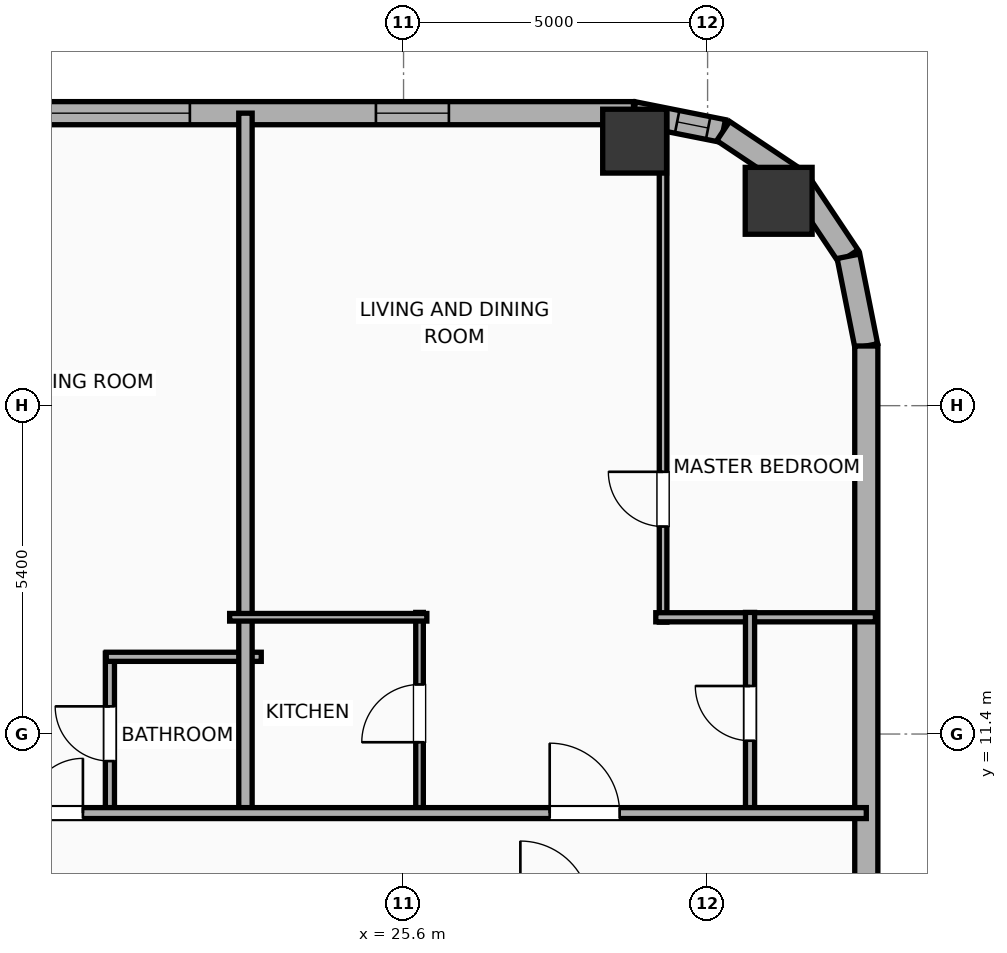
"""IFC4 building model, lengths in metres.
Left out: names, types, materials, properties, quantities, classifications, styles, units other than length and angle.
Written with IfcOpenShell. Run it as: python <this file> out.ifc"""

import sys

from ifc_helpers import new_model, si_unit, direction, frame, frame_2d, origin, origin_2d, place, context, subcontext, project, spatial, rectangle, hollow_rectangle, hollow_circle, extrude, element, fill, save


model = new_model("IFC4")
c1 = context("Model", 3, precision=1e-05, world=origin(), true_north=direction((0.0, 1.0)))
c2 = subcontext(c1, "Body", "Model", "MODEL_VIEW")
j1 = project(units=[si_unit("LENGTHUNIT", "METRE"), si_unit("PLANEANGLEUNIT", "RADIAN")], contexts=[c1])
p1 = place(None, origin())
s1 = spatial("IfcSite", under=j1, at=p1, CompositionType="ELEMENT")
p2 = place(p1, origin())
s2 = spatial("IfcBuilding", under=s1, at=p2, CompositionType="ELEMENT")
p3 = place(p2, frame((0.0, 0.0, 128.7)))
s3 = spatial("IfcBuildingStorey", under=s2, at=p3, CompositionType="ELEMENT", Elevation=128.7)
p4 = place(p3, frame((31.769, 20.169, 0.0), z_axis=(0.0, 0.0, 1.0), x_axis=(1.0, 0.0, 0.0)))
e1 = element("IfcColumn", 1, at=p4, inside=s3, PredefinedType="COLUMN", context=c2, shape_type="SweptSolid", body=[
    extrude(hollow_circle(Radius=0.55, WallThickness=0.036, at=origin_2d()), origin(), (0.0, 0.0, 1.0), 3.9),
])
p5 = place(p3, frame((29.4, 21.15, 0.0), z_axis=(0.0, 0.0, 1.0), x_axis=(1.0, 0.0, 0.0)))
e2 = element("IfcColumn", 2, at=p5, inside=s3, PredefinedType="COLUMN", context=c2, shape_type="SweptSolid", body=[
    extrude(hollow_rectangle(XDim=1.05, YDim=1.05, WallThickness=0.036, at=origin_2d()), origin(), (0.0, 0.0, 1.0), 3.9),
])
p6 = place(p3, frame((-25.381, 21.61, 0.0), z_axis=(0.0, 0.0, 1.0), x_axis=(1.0, 0.0, 0.0)))
e3 = element("IfcWall", 3, at=p6, inside=s3, PredefinedType="ELEMENTEDWALL", context=c2, shape_type="SweptSolid", body=[
    extrude(rectangle(XDim=54.763, YDim=0.38, at=frame_2d((27.381, 0.0))), origin(), (0.0, 0.0, 1.0), 3.65),
])
p7 = place(p6, frame((5.645, 0.0, 0.75)))
e4 = element("IfcOpeningElement", 4, at=p7, cuts=e3, PredefinedType="OPENING", context=c2, shape_type="SweptSolid", body=[
    extrude(rectangle(XDim=2.4, YDim=2.1, at=frame_2d((1.2, 1.05))), frame((0.0, 0.2, 0.0), z_axis=(0.0, -1.0, 0.0), x_axis=(1.0, 0.0, 0.0)), (0.0, 0.0, 1.0), 0.4),
])
p8 = place(p6, frame((45.067, 0.0, 0.75)))
e5 = element("IfcOpeningElement", 5, at=p8, cuts=e3, PredefinedType="OPENING", context=c2, shape_type="SweptSolid", body=[
    extrude(rectangle(XDim=2.4, YDim=2.1, at=frame_2d((1.2, 1.05))), frame((0.0, 0.2, 0.0), z_axis=(0.0, -1.0, 0.0), x_axis=(1.0, 0.0, 0.0)), (0.0, 0.0, 1.0), 0.4),
])
p9 = place(p6, frame((1.286, 0.0, 0.75)))
e6 = element("IfcOpeningElement", 6, at=p9, cuts=e3, PredefinedType="OPENING", context=c2, shape_type="SweptSolid", body=[
    extrude(rectangle(XDim=1.2, YDim=2.05, at=frame_2d((0.6, 1.025))), frame((0.0, 0.2, 0.0), z_axis=(0.0, -1.0, 0.0), x_axis=(1.0, 0.0, 0.0)), (0.0, 0.0, 1.0), 0.4),
])
p10 = place(p6, frame((3.501, 0.0, 0.75)))
e7 = element("IfcOpeningElement", 7, at=p10, cuts=e3, PredefinedType="OPENING", context=c2, shape_type="SweptSolid", body=[
    extrude(rectangle(XDim=1.2, YDim=2.05, at=frame_2d((0.6, 1.025))), frame((0.0, 0.2, 0.0), z_axis=(0.0, -1.0, 0.0), x_axis=(1.0, 0.0, 0.0)), (0.0, 0.0, 1.0), 0.4),
])
p11 = place(p6, frame((12.031, 0.0, 0.75)))
e8 = element("IfcOpeningElement", 8, at=p11, cuts=e3, PredefinedType="OPENING", context=c2, shape_type="SweptSolid", body=[
    extrude(rectangle(XDim=1.2, YDim=2.05, at=frame_2d((0.6, 1.025))), frame((0.0, 0.2, 0.0), z_axis=(0.0, -1.0, 0.0), x_axis=(1.0, 0.0, 0.0)), (0.0, 0.0, 1.0), 0.4),
])
p12 = place(p6, frame((19.805, 0.0, 0.75)))
e9 = element("IfcOpeningElement", 9, at=p12, cuts=e3, PredefinedType="OPENING", context=c2, shape_type="SweptSolid", body=[
    extrude(rectangle(XDim=1.2, YDim=2.05, at=frame_2d((0.6, 1.025))), frame((0.0, 0.2, 0.0), z_axis=(0.0, -1.0, 0.0), x_axis=(1.0, 0.0, 0.0)), (0.0, 0.0, 1.0), 0.4),
])
p13 = place(p6, frame((16.555, 0.0, 0.75)))
e10 = element("IfcOpeningElement", 10, at=p13, cuts=e3, PredefinedType="OPENING", context=c2, shape_type="SweptSolid", body=[
    extrude(rectangle(XDim=1.2, YDim=2.05, at=frame_2d((0.6, 1.025))), frame((0.0, 0.2, 0.0), z_axis=(0.0, -1.0, 0.0), x_axis=(1.0, 0.0, 0.0)), (0.0, 0.0, 1.0), 0.4),
])
p14 = place(p6, frame((23.866, 0.0, 0.75)))
e11 = element("IfcOpeningElement", 11, at=p14, cuts=e3, PredefinedType="OPENING", context=c2, shape_type="SweptSolid", body=[
    extrude(rectangle(XDim=1.2, YDim=2.05, at=frame_2d((0.6, 1.025))), frame((0.0, 0.2, 0.0), z_axis=(0.0, -1.0, 0.0), x_axis=(1.0, 0.0, 0.0)), (0.0, 0.0, 1.0), 0.4),
])
p15 = place(p6, frame((27.116, 0.0, 0.75)))
e12 = element("IfcOpeningElement", 12, at=p15, cuts=e3, PredefinedType="OPENING", context=c2, shape_type="SweptSolid", body=[
    extrude(rectangle(XDim=1.2, YDim=2.05, at=frame_2d((0.6, 1.025))), frame((0.0, 0.2, 0.0), z_axis=(0.0, -1.0, 0.0), x_axis=(1.0, 0.0, 0.0)), (0.0, 0.0, 1.0), 0.4),
])
p16 = place(p6, frame((30.931, 0.0, 0.75)))
e13 = element("IfcOpeningElement", 13, at=p16, cuts=e3, PredefinedType="OPENING", context=c2, shape_type="SweptSolid", body=[
    extrude(rectangle(XDim=1.2, YDim=2.05, at=frame_2d((0.6, 1.025))), frame((0.0, 0.2, 0.0), z_axis=(0.0, -1.0, 0.0), x_axis=(1.0, 0.0, 0.0)), (0.0, 0.0, 1.0), 0.4),
])
p17 = place(p6, frame((36.811, 0.0, 0.75)))
e14 = element("IfcOpeningElement", 14, at=p17, cuts=e3, PredefinedType="OPENING", context=c2, shape_type="SweptSolid", body=[
    extrude(rectangle(XDim=1.2, YDim=2.05, at=frame_2d((0.6, 1.025))), frame((0.0, 0.2, 0.0), z_axis=(0.0, -1.0, 0.0), x_axis=(1.0, 0.0, 0.0)), (0.0, 0.0, 1.0), 0.4),
])
p18 = place(p6, frame((40.061, 0.0, 0.75)))
e15 = element("IfcOpeningElement", 15, at=p18, cuts=e3, PredefinedType="OPENING", context=c2, shape_type="SweptSolid", body=[
    extrude(rectangle(XDim=1.2, YDim=2.05, at=frame_2d((0.6, 1.025))), frame((0.0, 0.2, 0.0), z_axis=(0.0, -1.0, 0.0), x_axis=(1.0, 0.0, 0.0)), (0.0, 0.0, 1.0), 0.4),
])
p19 = place(p6, frame((50.527, 0.0, 0.75)))
e16 = element("IfcOpeningElement", 16, at=p19, cuts=e3, PredefinedType="OPENING", context=c2, shape_type="SweptSolid", body=[
    extrude(rectangle(XDim=1.2, YDim=2.05, at=frame_2d((0.6, 1.025))), frame((0.0, 0.2, 0.0), z_axis=(0.0, -1.0, 0.0), x_axis=(1.0, 0.0, 0.0)), (0.0, 0.0, 1.0), 0.4),
])
p20 = place(p3, frame((29.381, 21.61, 0.0), z_axis=(0.0, 0.0, 1.0), x_axis=(0.980755066645, -0.195242155415, 0.0)))
e17 = element("IfcWall", 17, at=p20, inside=s3, PredefinedType="ELEMENTEDWALL", context=c2, shape_type="SweptSolid", body=[
    extrude(rectangle(XDim=1.504, YDim=0.38, at=frame_2d((0.752, 0.0))), origin(), (0.0, 0.0, 1.0), 3.65),
])
p21 = place(p20, frame((0.732, 0.0, 0.75)))
e18 = element("IfcOpeningElement", 18, at=p21, cuts=e17, PredefinedType="OPENING", context=c2, shape_type="SweptSolid", body=[
    extrude(rectangle(XDim=0.52, YDim=2.05, at=frame_2d((0.26, 1.025))), frame((0.0, 0.2, 0.0), z_axis=(0.0, -1.0, 0.0), x_axis=(1.0, 0.0, 0.0)), (0.0, 0.0, 1.0), 0.4),
])
p22 = place(p3, frame((30.857, 21.316, 0.0), z_axis=(0.0, 0.0, 1.0), x_axis=(0.831468045563, -0.555572577804, 0.0)))
e19 = element("IfcWall", 19, at=p22, inside=s3, PredefinedType="ELEMENTEDWALL", context=c2, shape_type="SweptSolid", body=[
    extrude(rectangle(XDim=1.485, YDim=0.38, at=frame_2d((0.742, 0.0))), origin(), (0.0, 0.0, 1.0), 3.65),
])
p23 = place(p3, frame((32.091, 20.491, 0.0), z_axis=(0.0, 0.0, 1.0), x_axis=(0.555610286119, -0.831442848281, 0.0)))
e20 = element("IfcWall", 20, at=p23, inside=s3, PredefinedType="ELEMENTEDWALL", context=c2, shape_type="SweptSolid", body=[
    extrude(rectangle(XDim=1.485, YDim=0.38, at=frame_2d((0.743, 0.0))), origin(), (0.0, 0.0, 1.0), 3.65),
])
p24 = place(p3, frame((32.917, 19.257, 0.0), z_axis=(0.0, 0.0, 1.0), x_axis=(0.195086038585, -0.980786132421, 0.0)))
e21 = element("IfcWall", 21, at=p24, inside=s3, PredefinedType="ELEMENTEDWALL", context=c2, shape_type="SweptSolid", body=[
    extrude(rectangle(XDim=1.504, YDim=0.38, at=frame_2d((0.752, 0.0))), origin(), (0.0, 0.0, 1.0), 3.65),
])
p25 = place(p3, frame((33.21, 17.781, 0.0), z_axis=(0.0, 0.0, 1.0), x_axis=(0.0, -1.0, 0.0)))
e22 = element("IfcWall", 22, at=p25, inside=s3, PredefinedType="ELEMENTEDWALL", context=c2, shape_type="SweptSolid", body=[
    extrude(rectangle(XDim=34.363, YDim=0.38, at=frame_2d((17.181, 0.0))), origin(), (0.0, 0.0, 1.0), 3.65),
])
p26 = place(p25, frame((31.687, 0.0, 0.75)))
e23 = element("IfcOpeningElement", 23, at=p26, cuts=e22, PredefinedType="OPENING", context=c2, shape_type="SweptSolid", body=[
    extrude(rectangle(XDim=1.2, YDim=2.05, at=frame_2d((0.6, 1.025))), frame((0.0, 0.2, 0.0), z_axis=(0.0, -1.0, 0.0), x_axis=(1.0, 0.0, 0.0)), (0.0, 0.0, 1.0), 0.4),
])
p27 = place(p25, frame((12.836, 0.0, 0.75)))
e24 = element("IfcOpeningElement", 24, at=p27, cuts=e22, PredefinedType="OPENING", context=c2, shape_type="SweptSolid", body=[
    extrude(rectangle(XDim=1.2, YDim=2.05, at=frame_2d((0.6, 1.025))), frame((0.0, 0.2, 0.0), z_axis=(0.0, -1.0, 0.0), x_axis=(1.0, 0.0, 0.0)), (0.0, 0.0, 1.0), 0.4),
])
p28 = place(p25, frame((21.386, 0.0, 0.75)))
e25 = element("IfcOpeningElement", 25, at=p28, cuts=e22, PredefinedType="OPENING", context=c2, shape_type="SweptSolid", body=[
    extrude(rectangle(XDim=1.2, YDim=2.05, at=frame_2d((0.6, 1.025))), frame((0.0, 0.2, 0.0), z_axis=(0.0, -1.0, 0.0), x_axis=(1.0, 0.0, 0.0)), (0.0, 0.0, 1.0), 0.4),
])
p29 = place(p3, frame((20.771, 10.08, 0.0), z_axis=(0.0, 0.0, 1.0), x_axis=(0.0, 1.0, 0.0)))
e26 = element("IfcWall", 26, at=p29, inside=s3, PredefinedType="PLUMBINGWALL", context=c2, shape_type="SweptSolid", body=[
    extrude(rectangle(XDim=2.65, YDim=0.15, at=frame_2d((1.325, 0.0))), origin(), (0.0, 0.0, 1.0), 3.65),
])
p30 = place(p29, frame((0.875, 0.0, 0.0)))
e27 = element("IfcOpeningElement", 27, at=p30, cuts=e26, PredefinedType="OPENING", context=c2, shape_type="SweptSolid", body=[
    extrude(rectangle(XDim=0.9, YDim=2.05, at=frame_2d((0.45, 1.025))), frame((0.0, 0.085, 0.0), z_axis=(0.0, -1.0, 0.0), x_axis=(1.0, 0.0, 0.0)), (0.0, 0.0, 1.0), 0.17),
])
p31 = place(p3, frame((20.711, 12.67, 0.0), z_axis=(0.0, 0.0, 1.0), x_axis=(1.0, 0.0, 0.0)))
e28 = element("IfcWall", 28, at=p31, inside=s3, PredefinedType="PLUMBINGWALL", context=c2, shape_type="SweptSolid", body=[
    extrude(rectangle(XDim=2.549, YDim=0.15, at=frame_2d((1.274, 0.0))), origin(), (0.0, 0.0, 1.0), 3.65),
])
p32 = place(p3, frame((23.0, 10.02, 0.0), z_axis=(0.0, 0.0, 1.0), x_axis=(0.0, 1.0, 0.0)))
e29 = element("IfcWall", 29, at=p32, inside=s3, PredefinedType="PARTITIONING", context=c2, shape_type="SweptSolid", body=[
    extrude(rectangle(XDim=11.59, YDim=0.22, at=frame_2d((5.795, 0.0))), origin(), (0.0, 0.0, 1.0), 3.65),
])
p33 = place(p3, frame((29.868, 13.24, 0.0), z_axis=(0.0, 0.0, 1.0), x_axis=(0.0, 1.0, 0.0)))
e30 = element("IfcWall", 30, at=p33, inside=s3, PredefinedType="PARTITIONING", context=c2, shape_type="SweptSolid", body=[
    extrude(rectangle(XDim=8.426, YDim=0.125, at=frame_2d((4.213, 0.0))), origin(), (0.0, 0.0, 1.0), 3.65),
])
p34 = place(p33, frame((1.572, 0.0, 0.0)))
e31 = element("IfcOpeningElement", 31, at=p34, cuts=e30, PredefinedType="OPENING", context=c2, shape_type="SweptSolid", body=[
    extrude(rectangle(XDim=0.9, YDim=2.05, at=frame_2d((0.45, 1.025))), frame((0.0, 0.073, 0.0), z_axis=(0.0, -1.0, 0.0), x_axis=(1.0, 0.0, 0.0)), (0.0, 0.0, 1.0), 0.145),
])
p35 = place(p3, frame((29.748, 13.32, 0.0), z_axis=(0.0, 0.0, 1.0), x_axis=(1.0, 0.0, 0.0)))
e32 = element("IfcWall", 32, at=p35, inside=s3, PredefinedType="PLUMBINGWALL", context=c2, shape_type="SweptSolid", body=[
    extrude(rectangle(XDim=3.612, YDim=0.15, at=frame_2d((1.806, 0.0))), origin(), (0.0, 0.0, 1.0), 3.65),
])
p36 = place(p3, frame((25.863, 10.08, 0.0), z_axis=(0.0, 0.0, 1.0), x_axis=(0.0, 1.0, 0.0)))
e33 = element("IfcWall", 33, at=p36, inside=s3, PredefinedType="PARTITIONING", context=c2, shape_type="SweptSolid", body=[
    extrude(rectangle(XDim=3.32, YDim=0.125, at=frame_2d((1.66, 0.0))), origin(), (0.0, 0.0, 1.0), 3.65),
])
p37 = place(p36, frame((1.185, 0.0, 0.0)))
e34 = element("IfcOpeningElement", 34, at=p37, cuts=e33, PredefinedType="OPENING", context=c2, shape_type="SweptSolid", body=[
    extrude(rectangle(XDim=0.95, YDim=2.05, at=frame_2d((0.475, 1.025))), frame((0.0, 0.073, 0.0), z_axis=(0.0, -1.0, 0.0), x_axis=(1.0, 0.0, 0.0)), (0.0, 0.0, 1.0), 0.145),
])
p38 = place(p3, frame((22.74, 13.32, 0.0), z_axis=(0.0, 0.0, 1.0), x_axis=(1.0, 0.0, 0.0)))
e35 = element("IfcWall", 35, at=p38, inside=s3, PredefinedType="PARTITIONING", context=c2, shape_type="SweptSolid", body=[
    extrude(rectangle(XDim=3.243, YDim=0.125, at=frame_2d((1.622, 0.0))), origin(), (0.0, 0.0, 1.0), 3.65),
])
p39 = place(p3, frame((31.298, 10.08, 0.0), z_axis=(0.0, 0.0, 1.0), x_axis=(0.0, 1.0, 0.0)))
e36 = element("IfcWall", 36, at=p39, inside=s3, PredefinedType="PLUMBINGWALL", context=c2, shape_type="SweptSolid", body=[
    extrude(rectangle(XDim=3.32, YDim=0.15, at=frame_2d((1.66, 0.0))), origin(), (0.0, 0.0, 1.0), 3.65),
])
p40 = place(p39, frame((1.21, 0.0, 0.0)))
e37 = element("IfcOpeningElement", 37, at=p40, cuts=e36, PredefinedType="OPENING", context=c2, shape_type="SweptSolid", body=[
    extrude(rectangle(XDim=0.9, YDim=2.05, at=frame_2d((0.45, 1.025))), frame((0.0, 0.085, 0.0), z_axis=(0.0, -1.0, 0.0), x_axis=(1.0, 0.0, 0.0)), (0.0, 0.0, 1.0), 0.17),
])
p41 = place(p3, frame((-29.21, 10.1, 0.0), z_axis=(0.0, 0.0, 1.0), x_axis=(1.0, 0.0, 0.0)))
e38 = element("IfcWall", 38, at=p41, inside=s3, PredefinedType="PARTITIONING", context=c2, shape_type="SweptSolid", body=[
    extrude(rectangle(XDim=62.42, YDim=0.18, at=frame_2d((31.21, 0.0))), origin(), (0.0, 0.0, 1.0), 3.65),
])
p42 = place(p41, frame((3.033, 0.0, 0.0)))
e39 = element("IfcOpeningElement", 39, at=p42, cuts=e38, PredefinedType="OPENING", context=c2, shape_type="SweptSolid", body=[
    extrude(rectangle(XDim=0.9, YDim=2.05, at=frame_2d((0.45, 1.025))), frame((0.0, 0.1, 0.0), z_axis=(0.0, -1.0, 0.0), x_axis=(1.0, 0.0, 0.0)), (0.0, 0.0, 1.0), 0.2),
])
p43 = place(p41, frame((10.573, 0.0, 0.0)))
e40 = element("IfcOpeningElement", 40, at=p43, cuts=e38, PredefinedType="OPENING", context=c2, shape_type="SweptSolid", body=[
    extrude(rectangle(XDim=1.15, YDim=2.05, at=frame_2d((0.575, 1.025))), frame((0.0, 0.1, 0.0), z_axis=(0.0, -1.0, 0.0), x_axis=(1.0, 0.0, 0.0)), (0.0, 0.0, 1.0), 0.2),
])
p44 = place(p41, frame((16.135, 0.0, 0.0)))
e41 = element("IfcOpeningElement", 41, at=p44, cuts=e38, PredefinedType="OPENING", context=c2, shape_type="SweptSolid", body=[
    extrude(rectangle(XDim=0.9, YDim=2.05, at=frame_2d((0.45, 1.025))), frame((0.0, 0.1, 0.0), z_axis=(0.0, -1.0, 0.0), x_axis=(1.0, 0.0, 0.0)), (0.0, 0.0, 1.0), 0.2),
])
p45 = place(p41, frame((23.632, 0.0, 0.0)))
e42 = element("IfcOpeningElement", 42, at=p45, cuts=e38, PredefinedType="OPENING", context=c2, shape_type="SweptSolid", body=[
    extrude(rectangle(XDim=1.15, YDim=2.05, at=frame_2d((0.575, 1.025))), frame((0.0, 0.1, 0.0), z_axis=(0.0, -1.0, 0.0), x_axis=(1.0, 0.0, 0.0)), (0.0, 0.0, 1.0), 0.2),
])
p46 = place(p41, frame((27.751, 0.0, 0.0)))
e43 = element("IfcOpeningElement", 43, at=p46, cuts=e38, PredefinedType="OPENING", context=c2, shape_type="SweptSolid", body=[
    extrude(rectangle(XDim=1.15, YDim=2.05, at=frame_2d((0.575, 1.025))), frame((0.0, 0.1, 0.0), z_axis=(0.0, -1.0, 0.0), x_axis=(1.0, 0.0, 0.0)), (0.0, 0.0, 1.0), 0.2),
])
p47 = place(p41, frame((35.635, 0.0, 0.0)))
e44 = element("IfcOpeningElement", 44, at=p47, cuts=e38, PredefinedType="OPENING", context=c2, shape_type="SweptSolid", body=[
    extrude(rectangle(XDim=0.9, YDim=2.05, at=frame_2d((0.45, 1.025))), frame((0.0, 0.1, 0.0), z_axis=(0.0, -1.0, 0.0), x_axis=(1.0, 0.0, 0.0)), (0.0, 0.0, 1.0), 0.2),
])
p48 = place(p41, frame((40.697, 0.0, 0.0)))
e45 = element("IfcOpeningElement", 45, at=p48, cuts=e38, PredefinedType="OPENING", context=c2, shape_type="SweptSolid", body=[
    extrude(rectangle(XDim=1.15, YDim=2.05, at=frame_2d((0.575, 1.025))), frame((0.0, 0.1, 0.0), z_axis=(0.0, -1.0, 0.0), x_axis=(1.0, 0.0, 0.0)), (0.0, 0.0, 1.0), 0.2),
])
p49 = place(p41, frame((48.637, 0.0, 0.0)))
e46 = element("IfcOpeningElement", 46, at=p49, cuts=e38, PredefinedType="OPENING", context=c2, shape_type="SweptSolid", body=[
    extrude(rectangle(XDim=0.9, YDim=2.05, at=frame_2d((0.45, 1.025))), frame((0.0, 0.1, 0.0), z_axis=(0.0, -1.0, 0.0), x_axis=(1.0, 0.0, 0.0)), (0.0, 0.0, 1.0), 0.2),
])
p50 = place(p41, frame((57.213, 0.0, 0.0)))
e47 = element("IfcOpeningElement", 47, at=p50, cuts=e38, PredefinedType="OPENING", context=c2, shape_type="SweptSolid", body=[
    extrude(rectangle(XDim=1.15, YDim=2.05, at=frame_2d((0.575, 1.025))), frame((0.0, 0.1, 0.0), z_axis=(0.0, -1.0, 0.0), x_axis=(1.0, 0.0, 0.0)), (0.0, 0.0, 1.0), 0.2),
])
p51 = place(p8, origin())
e48 = element("IfcWindow", 48, at=p51, inside=s3, PartitioningType="SINGLE_PANEL", PredefinedType="WINDOW", context=c2, shape_type="SweptSolid", body=[
    extrude(rectangle(XDim=2.4, YDim=2.1, at=frame_2d((1.2, 1.05))), frame((0.0, 0.03, 0.0), z_axis=(0.0, -1.0, 0.0), x_axis=(1.0, 0.0, 0.0)), (0.0, 0.0, 1.0), 0.06),
])
fill(e5, e48)
p52 = place(p19, origin())
e49 = element("IfcWindow", 49, at=p52, inside=s3, PartitioningType="SINGLE_PANEL", PredefinedType="WINDOW", context=c2, shape_type="SweptSolid", body=[
    extrude(rectangle(XDim=1.2, YDim=2.05, at=frame_2d((0.6, 1.025))), frame((0.0, 0.03, 0.0), z_axis=(0.0, -1.0, 0.0), x_axis=(1.0, 0.0, 0.0)), (0.0, 0.0, 1.0), 0.06),
])
fill(e16, e49)
p53 = place(p21, origin())
e50 = element("IfcWindow", 50, at=p53, inside=s3, PartitioningType="SINGLE_PANEL", PredefinedType="WINDOW", context=c2, shape_type="SweptSolid", body=[
    extrude(rectangle(XDim=0.52, YDim=2.05, at=frame_2d((0.26, 1.025))), frame((0.0, 0.03, 0.0), z_axis=(0.0, -1.0, 0.0), x_axis=(1.0, 0.0, 0.0)), (0.0, 0.0, 1.0), 0.06),
])
fill(e18, e50)
p54 = place(p30, origin())
e51 = element("IfcDoor", 51, at=p54, inside=s3, OperationType="SINGLE_SWING_RIGHT", PredefinedType="DOOR", context=c2, shape_type="SweptSolid", body=[
    extrude(rectangle(XDim=0.9, YDim=2.05, at=frame_2d((0.45, 1.025))), frame((0.0, 0.025, 0.0), z_axis=(0.0, -1.0, 0.0), x_axis=(1.0, 0.0, 0.0)), (0.0, 0.0, 1.0), 0.05),
])
fill(e27, e51)
p55 = place(p34, origin())
e52 = element("IfcDoor", 52, at=p55, inside=s3, OperationType="SINGLE_SWING_RIGHT", PredefinedType="DOOR", context=c2, shape_type="SweptSolid", body=[
    extrude(rectangle(XDim=0.9, YDim=2.05, at=frame_2d((0.45, 1.025))), frame((0.0, 0.025, 0.0), z_axis=(0.0, -1.0, 0.0), x_axis=(1.0, 0.0, 0.0)), (0.0, 0.0, 1.0), 0.05),
])
fill(e31, e52)
p56 = place(p37, origin())
e53 = element("IfcDoor", 53, at=p56, inside=s3, OperationType="SINGLE_SWING_LEFT", PredefinedType="DOOR", context=c2, shape_type="SweptSolid", body=[
    extrude(rectangle(XDim=0.95, YDim=2.05, at=frame_2d((0.475, 1.025))), frame((0.0, 0.025, 0.0), z_axis=(0.0, -1.0, 0.0), x_axis=(1.0, 0.0, 0.0)), (0.0, 0.0, 1.0), 0.05),
])
fill(e34, e53)
p57 = place(p40, origin())
e54 = element("IfcDoor", 54, at=p57, inside=s3, OperationType="SINGLE_SWING_RIGHT", PredefinedType="DOOR", context=c2, shape_type="SweptSolid", body=[
    extrude(rectangle(XDim=0.9, YDim=2.05, at=frame_2d((0.45, 1.025))), frame((0.0, 0.025, 0.0), z_axis=(0.0, -1.0, 0.0), x_axis=(1.0, 0.0, 0.0)), (0.0, 0.0, 1.0), 0.05),
])
fill(e37, e54)
p58 = place(p49, origin())
e55 = element("IfcDoor", 55, at=p58, inside=s3, OperationType="SINGLE_SWING_RIGHT", PredefinedType="DOOR", context=c2, shape_type="SweptSolid", body=[
    extrude(rectangle(XDim=0.9, YDim=2.05, at=frame_2d((0.45, 1.025))), frame((0.0, 0.025, 0.0), z_axis=(0.0, -1.0, 0.0), x_axis=(1.0, 0.0, 0.0)), (0.0, 0.0, 1.0), 0.05),
])
fill(e46, e55)
p59 = place(p50, origin())
e56 = element("IfcDoor", 56, at=p59, inside=s3, OperationType="SINGLE_SWING_LEFT", PredefinedType="DOOR", context=c2, shape_type="SweptSolid", body=[
    extrude(rectangle(XDim=1.15, YDim=2.05, at=frame_2d((0.575, 1.025))), frame((0.0, 0.025, 0.0), z_axis=(0.0, -1.0, 0.0), x_axis=(1.0, 0.0, 0.0)), (0.0, 0.0, 1.0), 0.05),
])
fill(e47, e56)
save(model, sys.argv[1])
